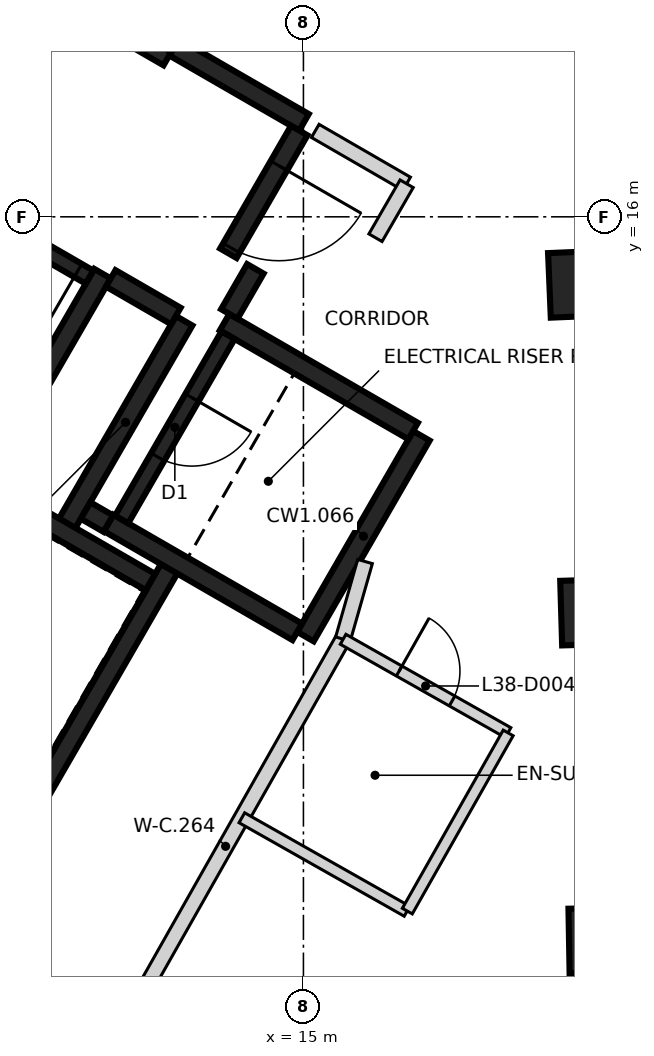
"""IFC4 building model, lengths in metres.
Left out: names, types, materials, properties, quantities, classifications, styles, units other than length and angle.
Written with IfcOpenShell. Run it as: python <this file> out.ifc"""

import sys

from ifc_helpers import new_model, si_unit, direction, frame, frame_2d, origin, origin_2d, place, context, subcontext, project, spatial, rectangle, extrude, element, fill, save


model = new_model("IFC4")
c1 = context("Model", 3, precision=1e-05, world=origin(), true_north=direction((0.0, 1.0)))
c2 = subcontext(c1, "Body", "Model", "MODEL_VIEW")
j1 = project(units=[si_unit("LENGTHUNIT", "METRE"), si_unit("PLANEANGLEUNIT", "RADIAN")], contexts=[c1])
p1 = place(None, origin())
s1 = spatial("IfcSite", under=j1, at=p1, CompositionType="ELEMENT")
p2 = place(p1, origin())
s2 = spatial("IfcBuilding", under=s1, at=p2, CompositionType="ELEMENT")
p3 = place(p2, frame((0.0, 0.0, 154.0)))
s3 = spatial("IfcBuildingStorey", under=s2, at=p3, CompositionType="ELEMENT", Elevation=154.0)
for number, where, z_axis, x_axis in (
    (1, (19.119, 6.484, -0.4), (0.0, 0.0, 1.0), (1.0, 0.018, 0.0)),
    (2, (19.016, 10.805, -0.4), (0.0, 0.0, 1.0), (1.0, 0.03, 0.0)),
    (3, (18.861, 15.124, -0.4), (0.0, 0.0, 1.0), (0.999, 0.042, 0.0)),
):
    element("IfcColumn", number, at=place(p3, frame(where, z_axis=z_axis, x_axis=x_axis)), inside=s3, PredefinedType="COLUMN", context=c2, shape_type="SweptSolid", body=[
        extrude(rectangle(XDim=1.25, YDim=0.85, at=origin_2d()), origin(), (0.0, 0.0, 1.0), 3.6),
    ])
p4 = place(p3, frame((13.238, 11.378, 0.0), z_axis=(0.0, 0.0, 1.0), x_axis=(-0.500008851346, -0.866020293397, 0.0)))
e4 = element("IfcWall", 4, at=p4, inside=s3, PredefinedType="SHEAR", context=c2, shape_type="SweptSolid", body=[
    extrude(rectangle(XDim=5.51, YDim=0.25, at=frame_2d((2.755, 0.0))), origin(), (0.0, 0.0, 1.0), 3.2),
])
p5 = place(p3, frame((12.357, 15.252, 0.0), z_axis=(0.0, 0.0, 1.0), x_axis=(-0.500028443584, -0.866008981251, 0.0)))
e5 = element("IfcWall", 5, at=p5, inside=s3, PredefinedType="SHEAR", context=c2, shape_type="SweptSolid", body=[
    extrude(rectangle(XDim=3.2, YDim=0.25, at=frame_2d((1.6, 0.0))), origin(), (0.0, 0.0, 1.0), 3.2),
])
p6 = place(p3, frame((16.552, 13.119, 0.0), z_axis=(0.0, 0.0, 1.0), x_axis=(-0.499978833458, -0.866037623948, 0.0)))
e6 = element("IfcWall", 6, at=p6, inside=s3, PredefinedType="SHEAR", context=c2, shape_type="SweptSolid", body=[
    extrude(rectangle(XDim=3.05, YDim=0.25, at=frame_2d((1.525, 0.0))), origin(), (0.0, 0.0, 1.0), 3.2),
])
p7 = place(p3, frame((14.918, 10.54, 0.0), z_axis=(0.0, 0.0, 1.0), x_axis=(-0.866063538972, 0.499933942099, 0.0)))
e7 = element("IfcWall", 7, at=p7, inside=s3, PredefinedType="SHEAR", context=c2, shape_type="SweptSolid", body=[
    extrude(rectangle(XDim=2.865, YDim=0.25, at=frame_2d((1.432, 0.0))), origin(), (0.0, 0.0, 1.0), 3.2),
])
p8 = place(p3, frame((13.963, 14.614, 0.0), z_axis=(0.0, 0.0, 1.0), x_axis=(0.866042235819, -0.499970844928, 0.0)))
e8 = element("IfcWall", 8, at=p8, inside=s3, PredefinedType="SHEAR", context=c2, shape_type="SweptSolid", body=[
    extrude(rectangle(XDim=2.865, YDim=0.25, at=frame_2d((1.432, 0.0))), origin(), (0.0, 0.0, 1.0), 3.2),
])
p9 = place(p3, frame((11.888, 11.961, 0.0), z_axis=(0.0, 0.0, 1.0), x_axis=(0.500003324108, 0.866023484601, 0.0)))
e9 = element("IfcWall", 9, at=p9, inside=s3, PredefinedType="SHEAR", context=c2, shape_type="SweptSolid", body=[
    extrude(rectangle(XDim=3.085, YDim=0.25, at=frame_2d((1.542, 0.0))), origin(), (0.0, 0.0, 1.0), 3.2),
])
p10 = place(p3, frame((10.865, 12.418, 0.0), z_axis=(0.0, 0.0, 1.0), x_axis=(0.866026229868, -0.499998569178, 0.0)))
e10 = element("IfcWall", 10, at=p10, inside=s3, PredefinedType="SHEAR", context=c2, shape_type="SweptSolid", body=[
    extrude(rectangle(XDim=2.449, YDim=0.25, at=frame_2d((1.225, 0.0))), origin(), (0.0, 0.0, 1.0), 3.2),
])
p11 = place(p3, frame((13.297, 18.231, 0.0), z_axis=(0.0, 0.0, 1.0), x_axis=(0.866043531843, -0.499968599967, 0.0)))
e11 = element("IfcWall", 11, at=p11, inside=s3, PredefinedType="SHEAR", context=c2, shape_type="SweptSolid", body=[
    extrude(rectangle(XDim=1.975, YDim=0.25, at=frame_2d((0.987, 0.0))), origin(), (0.0, 0.0, 1.0), 3.2),
])
p12 = place(p3, frame((14.945, 17.135, 0.0), z_axis=(0.0, 0.0, 1.0), x_axis=(-0.499983108224, -0.866035156036, 0.0)))
e12 = element("IfcWall", 12, at=p12, inside=s3, PredefinedType="SHEAR", context=c2, shape_type="SweptSolid", body=[
    extrude(rectangle(XDim=1.865, YDim=0.25, at=frame_2d((0.932, 0.0))), origin(), (0.0, 0.0, 1.0), 3.2),
])
p13 = place(p12, frame((0.535, 0.0, 0.0)))
e13 = element("IfcOpeningElement", 13, at=p13, cuts=e12, PredefinedType="OPENING", context=c2, shape_type="SweptSolid", body=[
    extrude(rectangle(XDim=1.25, YDim=2.1, at=frame_2d((0.625, 1.05))), frame((0.0, 0.135, 0.0), z_axis=(0.0, -1.0, 0.0), x_axis=(1.0, 0.0, 0.0)), (0.0, 0.0, 1.0), 0.27),
])
p14 = place(p3, frame((13.322, 14.695, 0.0), z_axis=(0.0, 0.0, 1.0), x_axis=(-0.866017078145, 0.500014420154, 0.0)))
e14 = element("IfcWall", 14, at=p14, inside=s3, PredefinedType="SHEAR", context=c2, shape_type="SweptSolid", body=[
    extrude(rectangle(XDim=0.989, YDim=0.25, at=frame_2d((0.495, 0.0))), origin(), (0.0, 0.0, 1.0), 3.2),
])
p15 = place(p3, frame((14.368, 15.315, 0.0), z_axis=(0.0, 0.0, 1.0), x_axis=(-0.499897359611, -0.866084655132, 0.0)))
e15 = element("IfcWall", 15, at=p15, inside=s3, PredefinedType="SHEAR", context=c2, shape_type="SweptSolid", body=[
    extrude(rectangle(XDim=0.685, YDim=0.25, at=frame_2d((0.342, 0.0))), origin(), (0.0, 0.0, 1.0), 3.2),
])
p16 = place(p3, frame((12.433, 11.964, 0.0), z_axis=(0.0, 0.0, 1.0), x_axis=(-0.866055875208, 0.499947218231, 0.0)))
e16 = element("IfcWall", 16, at=p16, inside=s3, PredefinedType="SHEAR", context=c2, shape_type="SweptSolid", body=[
    extrude(rectangle(XDim=0.345, YDim=0.25, at=frame_2d((0.172, 0.0))), origin(), (0.0, 0.0, 1.0), 3.2),
])
p17 = place(p3, frame((13.21, 18.08, 0.0), z_axis=(0.0, 0.0, 1.0), x_axis=(-0.866030299012, 0.499991521122, 0.0)))
e17 = element("IfcWall", 17, at=p17, inside=s3, PredefinedType="SHEAR", context=c2, shape_type="SweptSolid", body=[
    extrude(rectangle(XDim=6.1, YDim=0.2, at=frame_2d((3.05, 0.0))), origin(), (0.0, 0.0, 1.0), 3.2),
])
p18 = place(p17, frame((1.0, 0.0, 0.0)))
e18 = element("IfcOpeningElement", 18, at=p18, cuts=e17, PredefinedType="OPENING", context=c2, shape_type="SweptSolid", body=[
    extrude(rectangle(XDim=1.2, YDim=2.1, at=frame_2d((0.6, 1.05))), frame((0.0, 0.11, 0.0), z_axis=(0.0, -1.0, 0.0), x_axis=(1.0, 0.0, 0.0)), (0.0, 0.0, 1.0), 0.22),
])
p19 = place(p17, frame((4.05, 0.0, 0.0)))
e19 = element("IfcOpeningElement", 19, at=p19, cuts=e17, PredefinedType="OPENING", context=c2, shape_type="SweptSolid", body=[
    extrude(rectangle(XDim=1.2, YDim=2.1, at=frame_2d((0.6, 1.05))), frame((0.0, 0.11, 0.0), z_axis=(0.0, -1.0, 0.0), x_axis=(1.0, 0.0, 0.0)), (0.0, 0.0, 1.0), 0.22),
])
p20 = place(p3, frame((12.185, 15.207, 0.0), z_axis=(0.0, 0.0, 1.0), x_axis=(-0.866020080793, 0.500009219579, 0.0)))
e20 = element("IfcWall", 20, at=p20, inside=s3, PredefinedType="SHEAR", context=c2, shape_type="SweptSolid", body=[
    extrude(rectangle(XDim=5.699, YDim=0.2, at=frame_2d((2.85, 0.0))), origin(), (0.0, 0.0, 1.0), 3.2),
])
p21 = place(p20, frame((0.174, 0.0, 0.0)))
e21 = element("IfcOpeningElement", 21, at=p21, cuts=e20, PredefinedType="OPENING", context=c2, shape_type="SweptSolid", body=[
    extrude(rectangle(XDim=0.9, YDim=2.1, at=frame_2d((0.45, 1.05))), frame((0.0, 0.11, 0.0), z_axis=(0.0, -1.0, 0.0), x_axis=(1.0, 0.0, 0.0)), (0.0, 0.0, 1.0), 0.22),
])
p22 = place(p20, frame((4.599, 0.0, 0.0)))
e22 = element("IfcOpeningElement", 22, at=p22, cuts=e20, PredefinedType="OPENING", context=c2, shape_type="SweptSolid", body=[
    extrude(rectangle(XDim=0.9, YDim=2.1, at=frame_2d((0.45, 1.05))), frame((0.0, 0.11, 0.0), z_axis=(0.0, -1.0, 0.0), x_axis=(1.0, 0.0, 0.0)), (0.0, 0.0, 1.0), 0.22),
])
p23 = place(p3, frame((14.008, 14.442, 0.0), z_axis=(0.0, 0.0, 1.0), x_axis=(-0.499986818241, -0.866033014143, 0.0)))
e23 = element("IfcWall", 23, at=p23, inside=s3, PredefinedType="SHEAR", context=c2, shape_type="SweptSolid", body=[
    extrude(rectangle(XDim=2.798, YDim=0.2, at=frame_2d((1.399, 0.0))), origin(), (0.0, 0.0, 1.0), 3.2),
])
p24 = place(p23, frame((0.949, 0.0, 0.0)))
e24 = element("IfcOpeningElement", 24, at=p24, cuts=e23, PredefinedType="OPENING", context=c2, shape_type="SweptSolid", body=[
    extrude(rectangle(XDim=0.9, YDim=2.1, at=frame_2d((0.45, 1.05))), frame((0.0, 0.11, 0.0), z_axis=(0.0, -1.0, 0.0), x_axis=(1.0, 0.0, 0.0)), (0.0, 0.0, 1.0), 0.22),
])
p25 = place(p3, frame((12.433, 4.992, 0.0), z_axis=(0.0, 0.0, 1.0), x_axis=(0.492572049538, 0.870271667937, 0.0)))
e25 = element("IfcWall", 25, at=p25, inside=s3, PredefinedType="PARTITIONING", context=c2, shape_type="SweptSolid", body=[
    extrude(rectangle(XDim=6.265, YDim=0.2, at=frame_2d((3.133, 0.0))), origin(), (0.0, 0.0, 1.0), 3.2),
])
p26 = place(p3, frame((15.156, 17.13, 0.0), z_axis=(0.0, 0.0, 1.0), x_axis=(0.865755062894, -0.500467952093, 0.0)))
e26 = element("IfcWall", 26, at=p26, inside=s3, PredefinedType="PARTITIONING", context=c2, shape_type="SweptSolid", body=[
    extrude(rectangle(XDim=1.389, YDim=0.2, at=frame_2d((0.694, 0.0))), origin(), (0.0, 0.0, 1.0), 3.2),
])
p27 = place(p3, frame((15.52, 10.445, 0.0), z_axis=(0.0, 0.0, 1.0), x_axis=(0.274143458758, 0.961688808306, 0.0)))
e27 = element("IfcWall", 27, at=p27, inside=s3, PredefinedType="PARTITIONING", context=c2, shape_type="SweptSolid", body=[
    extrude(rectangle(XDim=1.061, YDim=0.2, at=frame_2d((0.53, 0.0))), origin(), (0.0, 0.0, 1.0), 3.2),
])
p28 = place(p3, frame((15.948, 15.725, 0.0), z_axis=(0.0, 0.0, 1.0), x_axis=(0.500014611105, 0.866016967894, 0.0)))
e28 = element("IfcWall", 28, at=p28, inside=s3, PredefinedType="PARTITIONING", context=c2, shape_type="SweptSolid", body=[
    extrude(rectangle(XDim=0.82, YDim=0.2, at=frame_2d((0.41, 0.0))), origin(), (0.0, 0.0, 1.0), 3.2),
])
p29 = place(p3, frame((14.19, 8.094, 0.0), z_axis=(0.0, 0.0, 1.0), x_axis=(0.870269507955, -0.492575865754, 0.0)))
e29 = element("IfcWall", 29, at=p29, inside=s3, PredefinedType="PARTITIONING", context=c2, shape_type="SweptSolid", body=[
    extrude(rectangle(XDim=2.497, YDim=0.15, at=frame_2d((1.249, 0.0))), origin(), (0.0, 0.0, 1.0), 3.2),
])
p30 = place(p3, frame((15.522, 10.442, 0.0), z_axis=(0.0, 0.0, 1.0), x_axis=(0.870338423523, -0.492454087747, 0.0)))
e30 = element("IfcWall", 30, at=p30, inside=s3, PredefinedType="PARTITIONING", context=c2, shape_type="SweptSolid", body=[
    extrude(rectangle(XDim=2.493, YDim=0.15, at=frame_2d((1.247, 0.0))), origin(), (0.0, 0.0, 1.0), 3.2),
])
p31 = place(p30, frame((0.847, 0.0, 0.0)))
e31 = element("IfcOpeningElement", 31, at=p31, cuts=e30, PredefinedType="OPENING", context=c2, shape_type="SweptSolid", body=[
    extrude(rectangle(XDim=0.8, YDim=2.1, at=frame_2d((0.4, 1.05))), frame((0.0, 0.085, 0.0), z_axis=(0.0, -1.0, 0.0), x_axis=(1.0, 0.0, 0.0)), (0.0, 0.0, 1.0), 0.17),
])
p32 = place(p3, frame((16.367, 6.866, 0.0), z_axis=(0.0, 0.0, 1.0), x_axis=(0.492699238561, 0.870199666928, 0.0)))
e32 = element("IfcWall", 32, at=p32, inside=s3, PredefinedType="PARTITIONING", context=c2, shape_type="SweptSolid", body=[
    extrude(rectangle(XDim=2.694, YDim=0.15, at=frame_2d((1.347, 0.0))), origin(), (0.0, 0.0, 1.0), 3.2),
])
p33 = place(p13, origin())
e33 = element("IfcDoor", 33, at=p33, inside=s3, OperationType="SINGLE_SWING_LEFT", PredefinedType="DOOR", context=c2, shape_type="SweptSolid", body=[
    extrude(rectangle(XDim=1.25, YDim=2.1, at=frame_2d((0.625, 1.05))), frame((0.0, 0.025, 0.0), z_axis=(0.0, -1.0, 0.0), x_axis=(1.0, 0.0, 0.0)), (0.0, 0.0, 1.0), 0.05),
])
fill(e13, e33)
p34 = place(p21, origin())
e34 = element("IfcDoor", 34, at=p34, inside=s3, OperationType="SINGLE_SWING_LEFT", PredefinedType="DOOR", context=c2, shape_type="SweptSolid", body=[
    extrude(rectangle(XDim=0.9, YDim=2.1, at=frame_2d((0.45, 1.05))), frame((0.0, 0.025, 0.0), z_axis=(0.0, -1.0, 0.0), x_axis=(1.0, 0.0, 0.0)), (0.0, 0.0, 1.0), 0.05),
])
fill(e21, e34)
p35 = place(p24, origin())
e35 = element("IfcDoor", 35, at=p35, inside=s3, OperationType="SINGLE_SWING_LEFT", PredefinedType="DOOR", context=c2, shape_type="SweptSolid", body=[
    extrude(rectangle(XDim=0.9, YDim=2.1, at=frame_2d((0.45, 1.05))), frame((0.0, 0.025, 0.0), z_axis=(0.0, -1.0, 0.0), x_axis=(1.0, 0.0, 0.0)), (0.0, 0.0, 1.0), 0.05),
])
fill(e24, e35)
p36 = place(p31, origin())
e36 = element("IfcDoor", 36, at=p36, inside=s3, OperationType="SINGLE_SWING_LEFT", PredefinedType="DOOR", context=c2, shape_type="SweptSolid", body=[
    extrude(rectangle(XDim=0.8, YDim=2.1, at=frame_2d((0.4, 1.05))), frame((0.0, 0.025, 0.0), z_axis=(0.0, -1.0, 0.0), x_axis=(1.0, 0.0, 0.0)), (0.0, 0.0, 1.0), 0.05),
])
fill(e31, e36)
save(model, sys.argv[1])
